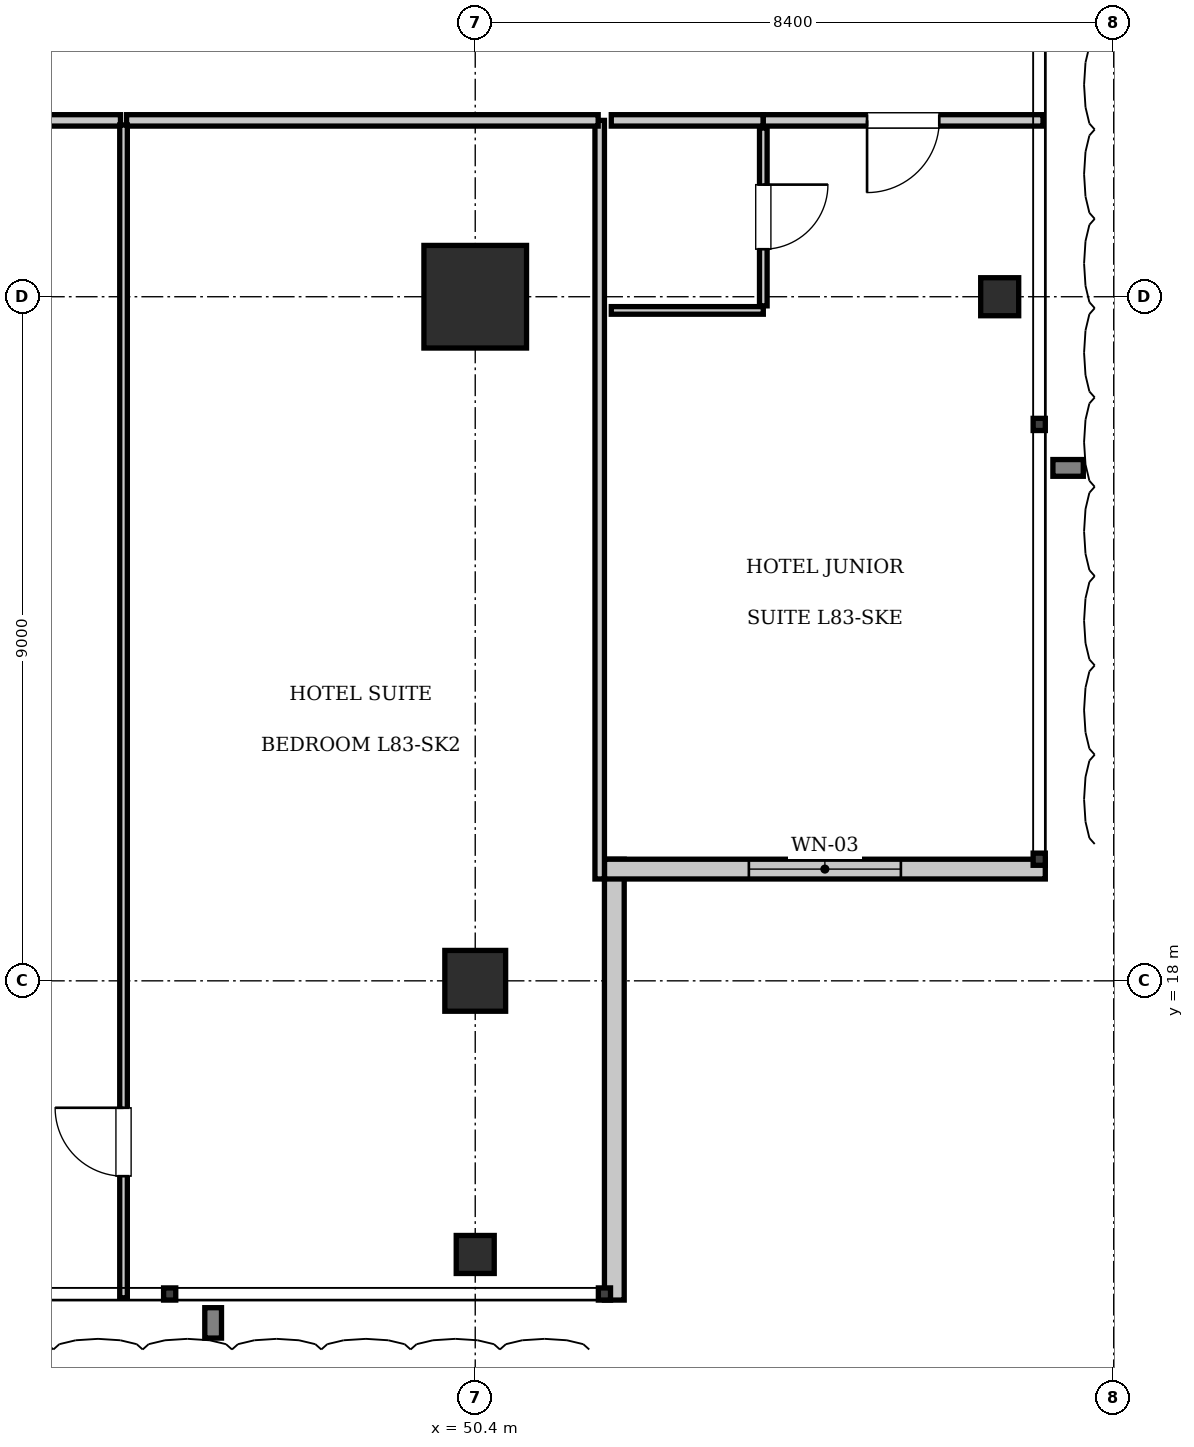
"""IFC4 building model, lengths in metres.
Left out: names, types, materials, properties, quantities, classifications, styles, units other than length and angle.
Written with IfcOpenShell. Run it as: python <this file> out.ifc"""

import sys

from ifc_helpers import new_model, si_unit, direction, frame, frame_2d, origin, origin_2d, place, context, subcontext, project, spatial, rectangle, i_section, extrude, element, fill, save


model = new_model("IFC4")
c1 = context("Model", 3, precision=1e-05, world=origin(), true_north=direction((0.0, 1.0)))
c2 = subcontext(c1, "Body", "Model", "MODEL_VIEW")
j1 = project(units=[si_unit("LENGTHUNIT", "METRE"), si_unit("PLANEANGLEUNIT", "RADIAN")], contexts=[c1])
p1 = place(None, origin())
s1 = spatial("IfcSite", under=j1, at=p1, CompositionType="ELEMENT")
p2 = place(p1, origin())
s2 = spatial("IfcBuilding", under=s1, at=p2, CompositionType="ELEMENT")
p3 = place(p2, frame((0.0, 0.0, 337.4)))
s3 = spatial("IfcBuildingStorey", under=s2, at=p3, CompositionType="ELEMENT", Elevation=337.4)
p4 = place(p3, frame((50.4, 27.0, 0.0), z_axis=(0.0, 0.0, 1.0), x_axis=(1.0, 0.0, 0.0)))
e1 = element("IfcColumn", 1, at=p4, inside=s3, PredefinedType="COLUMN", context=c2, shape_type="SweptSolid", body=[
    extrude(rectangle(XDim=1.35, YDim=1.35, at=origin_2d()), origin(), (0.0, 0.0, 1.0), 3.85),
])
p5 = place(p3, frame((50.4, 18.0, 0.0), z_axis=(0.0, 0.0, 1.0), x_axis=(1.0, 0.0, 0.0)))
e2 = element("IfcColumn", 2, at=p5, inside=s3, PredefinedType="COLUMN", context=c2, shape_type="SweptSolid", body=[
    extrude(rectangle(XDim=0.8, YDim=0.8, at=origin_2d()), origin(), (0.0, 0.0, 1.0), 3.85),
])
for number, where, z_axis, x_axis in (
    (3, (57.3, 27.0, 0.0), (0.0, 0.0, 1.0), (1.0, 0.0, 0.0)),
    (4, (50.4, 14.4, 0.0), (0.0, 0.0, 1.0), (1.0, 0.0, 0.0)),
):
    element("IfcColumn", number, at=place(p3, frame(where, z_axis=z_axis, x_axis=x_axis)), inside=s3, PredefinedType="COLUMN", context=c2, shape_type="SweptSolid", body=[
        extrude(i_section(OverallWidth=0.5, OverallDepth=0.5, WebThickness=0.022, FlangeThickness=0.032, at=origin_2d()), origin(), (0.0, 0.0, 1.0), 3.85),
    ])
p6 = place(p3, frame((52.23, 19.6, 0.0), z_axis=(0.0, 0.0, 1.0), x_axis=(0.0, -1.0, 0.0)))
e5 = element("IfcWall", 5, at=p6, inside=s3, PredefinedType="SOLIDWALL", context=c2, shape_type="SweptSolid", body=[
    extrude(rectangle(XDim=5.8, YDim=0.26, at=frame_2d((2.9, 0.0))), origin(), (0.0, 0.0, 1.0), 3.61),
])
p7 = place(p3, frame((57.9, 19.47, 0.0), z_axis=(0.0, 0.0, 1.0), x_axis=(-1.0, 0.0, 0.0)))
e6 = element("IfcWall", 6, at=p7, inside=s3, PredefinedType="SOLIDWALL", context=c2, shape_type="SweptSolid", body=[
    extrude(rectangle(XDim=5.8, YDim=0.26, at=frame_2d((2.9, 0.0))), origin(), (0.0, 0.0, 1.0), 3.61),
])
p8 = place(p7, frame((1.9, 0.0, 0.9)))
e7 = element("IfcOpeningElement", 7, at=p8, cuts=e6, PredefinedType="OPENING", context=c2, shape_type="SweptSolid", body=[
    extrude(rectangle(XDim=2.0, YDim=2.2, at=frame_2d((1.0, 1.1))), frame((0.0, 0.14, 0.0), z_axis=(0.0, -1.0, 0.0), x_axis=(1.0, 0.0, 0.0)), (0.0, 0.0, 1.0), 0.28),
])
p9 = place(p3, frame((52.038, 19.34, 0.0), z_axis=(0.0, 0.0, 1.0), x_axis=(0.0, 1.0, 0.0)))
e8 = element("IfcWall", 8, at=p9, inside=s3, PredefinedType="PARTITIONING", context=c2, shape_type="SweptSolid", body=[
    extrude(rectangle(XDim=9.98, YDim=0.125, at=frame_2d((4.99, 0.0))), origin(), (0.0, 0.0, 1.0), 3.61),
])
p10 = place(p3, frame((40.15, 29.32, 0.0), z_axis=(0.0, 0.0, 1.0), x_axis=(1.0, 0.0, 0.0)))
e9 = element("IfcWall", 9, at=p10, inside=s3, PredefinedType="PARTITIONING", context=c2, shape_type="SweptSolid", body=[
    extrude(rectangle(XDim=5.583, YDim=0.15, at=frame_2d((2.792, 0.0))), origin(), (0.0, 0.0, 1.0), 3.61),
])
p11 = place(p10, frame((2.316, 0.0, 0.0)))
e10 = element("IfcOpeningElement", 10, at=p11, cuts=e9, PredefinedType="OPENING", context=c2, shape_type="SweptSolid", body=[
    extrude(rectangle(XDim=0.95, YDim=2.15, at=frame_2d((0.475, 1.075))), frame((0.0, 0.085, 0.0), z_axis=(0.0, -1.0, 0.0), x_axis=(1.0, 0.0, 0.0)), (0.0, 0.0, 1.0), 0.17),
])
p12 = place(p3, frame((45.813, 29.32, 0.0), z_axis=(0.0, 0.0, 1.0), x_axis=(1.0, 0.0, 0.0)))
e11 = element("IfcWall", 11, at=p12, inside=s3, PredefinedType="PARTITIONING", context=c2, shape_type="SweptSolid", body=[
    extrude(rectangle(XDim=6.205, YDim=0.15, at=frame_2d((3.102, 0.0))), origin(), (0.0, 0.0, 1.0), 3.61),
])
p13 = place(p3, frame((45.773, 13.83, 0.0), z_axis=(0.0, 0.0, 1.0), x_axis=(0.0, 1.0, 0.0)))
e12 = element("IfcWall", 12, at=p13, inside=s3, PredefinedType="PARTITIONING", context=c2, shape_type="SweptSolid", body=[
    extrude(rectangle(XDim=15.43, YDim=0.1, at=frame_2d((7.715, 0.0))), origin(), (0.0, 0.0, 1.0), 3.61),
])
p14 = place(p13, frame((1.6, 0.0, 0.0)))
e13 = element("IfcOpeningElement", 13, at=p14, cuts=e12, PredefinedType="OPENING", context=c2, shape_type="SweptSolid", body=[
    extrude(rectangle(XDim=0.9, YDim=2.1, at=frame_2d((0.45, 1.05))), frame((0.0, 0.06, 0.0), z_axis=(0.0, -1.0, 0.0), x_axis=(1.0, 0.0, 0.0)), (0.0, 0.0, 1.0), 0.12),
])
p15 = place(p3, frame((52.19, 29.32, 0.0), z_axis=(0.0, 0.0, 1.0), x_axis=(1.0, 0.0, 0.0)))
e14 = element("IfcWall", 14, at=p15, inside=s3, PredefinedType="PARTITIONING", context=c2, shape_type="SweptSolid", body=[
    extrude(rectangle(XDim=2.0, YDim=0.15, at=frame_2d((1.0, 0.0))), origin(), (0.0, 0.0, 1.0), 3.61),
])
p16 = place(p3, frame((52.19, 26.82, 0.0), z_axis=(0.0, 0.0, 1.0), x_axis=(1.0, 0.0, 0.0)))
e15 = element("IfcWall", 15, at=p16, inside=s3, PredefinedType="PARTITIONING", context=c2, shape_type="SweptSolid", body=[
    extrude(rectangle(XDim=2.0, YDim=0.1, at=frame_2d((1.0, 0.0))), origin(), (0.0, 0.0, 1.0), 3.61),
])
p17 = place(p3, frame((54.19, 26.88, 0.0), z_axis=(0.0, 0.0, 1.0), x_axis=(0.0, 1.0, 0.0)))
e16 = element("IfcWall", 16, at=p17, inside=s3, PredefinedType="PARTITIONING", context=c2, shape_type="SweptSolid", body=[
    extrude(rectangle(XDim=2.34, YDim=0.1, at=frame_2d((1.17, 0.0))), origin(), (0.0, 0.0, 1.0), 3.61),
])
p18 = place(p17, frame((0.745, 0.0, 0.0)))
e17 = element("IfcOpeningElement", 17, at=p18, cuts=e16, PredefinedType="OPENING", context=c2, shape_type="SweptSolid", body=[
    extrude(rectangle(XDim=0.85, YDim=2.1, at=frame_2d((0.425, 1.05))), frame((0.0, 0.06, 0.0), z_axis=(0.0, -1.0, 0.0), x_axis=(1.0, 0.0, 0.0)), (0.0, 0.0, 1.0), 0.12),
])
p19 = place(p3, frame((54.19, 29.32, 0.0), z_axis=(0.0, 0.0, 1.0), x_axis=(1.0, 0.0, 0.0)))
e18 = element("IfcWall", 18, at=p19, inside=s3, PredefinedType="PARTITIONING", context=c2, shape_type="SweptSolid", body=[
    extrude(rectangle(XDim=3.68, YDim=0.15, at=frame_2d((1.84, 0.0))), origin(), (0.0, 0.0, 1.0), 3.61),
])
p20 = place(p19, frame((1.365, 0.0, 0.0)))
e19 = element("IfcOpeningElement", 19, at=p20, cuts=e18, PredefinedType="OPENING", context=c2, shape_type="SweptSolid", body=[
    extrude(rectangle(XDim=0.95, YDim=2.15, at=frame_2d((0.475, 1.075))), frame((0.0, 0.085, 0.0), z_axis=(0.0, -1.0, 0.0), x_axis=(1.0, 0.0, 0.0)), (0.0, 0.0, 1.0), 0.17),
])
p21 = place(p8, origin())
e20 = element("IfcWindow", 20, at=p21, inside=s3, PartitioningType="SINGLE_PANEL", PredefinedType="WINDOW", context=c2, shape_type="SweptSolid", body=[
    extrude(rectangle(XDim=2.0, YDim=2.2, at=frame_2d((1.0, 1.1))), frame((0.0, 0.03, 0.0), z_axis=(0.0, -1.0, 0.0), x_axis=(1.0, 0.0, 0.0)), (0.0, 0.0, 1.0), 0.06),
])
fill(e7, e20)
p22 = place(p14, origin())
e21 = element("IfcDoor", 21, at=p22, inside=s3, OperationType="SINGLE_SWING_RIGHT", PredefinedType="DOOR", context=c2, shape_type="SweptSolid", body=[
    extrude(rectangle(XDim=0.9, YDim=2.1, at=frame_2d((0.45, 1.05))), frame((0.0, 0.025, 0.0), z_axis=(0.0, -1.0, 0.0), x_axis=(1.0, 0.0, 0.0)), (0.0, 0.0, 1.0), 0.05),
])
fill(e13, e21)
p23 = place(p18, frame((0.85, 0.0, 0.0), z_axis=(0.0, 0.0, 1.0), x_axis=(-1.0, 0.0, 0.0)))
e22 = element("IfcDoor", 22, at=p23, inside=s3, OperationType="SINGLE_SWING_LEFT", PredefinedType="DOOR", context=c2, shape_type="SweptSolid", body=[
    extrude(rectangle(XDim=0.85, YDim=2.1, at=frame_2d((0.425, 1.05))), frame((0.0, 0.025, 0.0), z_axis=(0.0, -1.0, 0.0), x_axis=(1.0, 0.0, 0.0)), (0.0, 0.0, 1.0), 0.05),
])
fill(e17, e22)
p24 = place(p20, frame((0.95, 0.0, 0.0), z_axis=(0.0, 0.0, 1.0), x_axis=(-1.0, 0.0, 0.0)))
e23 = element("IfcDoor", 23, at=p24, inside=s3, OperationType="SINGLE_SWING_RIGHT", PredefinedType="DOOR", context=c2, shape_type="SweptSolid", body=[
    extrude(rectangle(XDim=0.95, YDim=2.15, at=frame_2d((0.475, 1.075))), frame((0.0, 0.025, 0.0), z_axis=(0.0, -1.0, 0.0), x_axis=(1.0, 0.0, 0.0)), (0.0, 0.0, 1.0), 0.05),
])
fill(e19, e23)
save(model, sys.argv[1])
